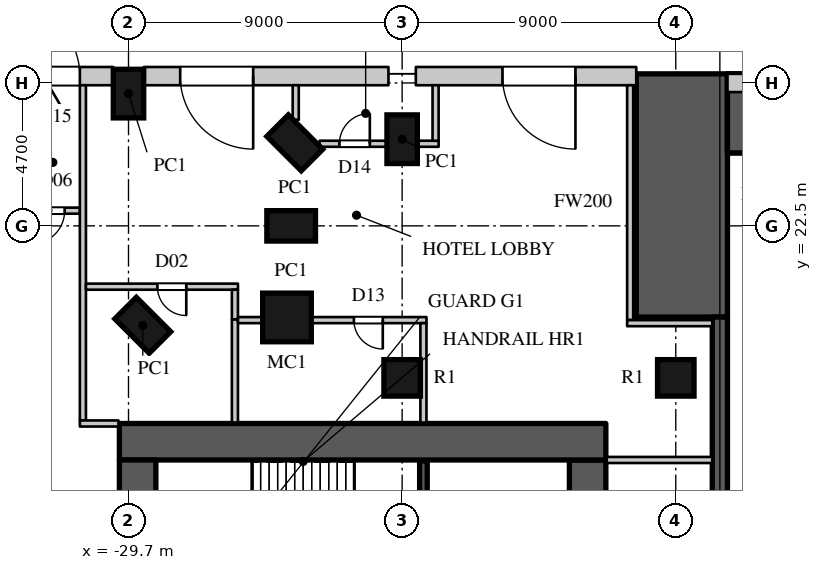
"""IFC4 building model, lengths in metres.
Left out: names, types, materials, properties, quantities, classifications, styles, units other than length and angle.
Written with IfcOpenShell. Run it as: python <this file> out.ifc"""

import sys

from ifc_helpers import new_model, si_unit, direction, frame, frame_2d, origin, origin_2d, place, context, subcontext, project, spatial, polyline, rectangle, circle, outline, extrude, element, fill, save


model = new_model("IFC4")
c1 = context("Model", 3, precision=1e-05, world=origin(), true_north=direction((0.0, 1.0)))
c2 = subcontext(c1, "Body", "Model", "MODEL_VIEW")
j1 = project(units=[si_unit("LENGTHUNIT", "METRE"), si_unit("PLANEANGLEUNIT", "RADIAN")], contexts=[c1])
p1 = place(None, origin())
s1 = spatial("IfcSite", under=j1, at=p1, CompositionType="ELEMENT")
p2 = place(p1, origin())
s2 = spatial("IfcBuilding", under=s1, at=p2, CompositionType="ELEMENT")
p3 = place(p2, origin())
s3 = spatial("IfcBuildingStorey", under=s2, at=p3, CompositionType="ELEMENT", Elevation=0.0)
p4 = place(p3, frame((-11.5, 19.5, 0.0), z_axis=(0.0, 0.0, 1.0), x_axis=(0.0, 1.0, 0.0)))
e1 = element("IfcWall", 1, at=p4, inside=s3, PredefinedType="SOLIDWALL", context=c2, shape_type="SweptSolid", body=[
    extrude(rectangle(XDim=8.0, YDim=3.0, at=frame_2d((4.0, 0.0))), origin(), (0.0, 0.0, 1.0), 9.0),
])
p5 = place(p3, frame((-10.25, -19.5, 0.0), z_axis=(0.0, 0.0, 1.0), x_axis=(0.0, 1.0, 0.0)))
e2 = element("IfcWall", 2, at=p5, inside=s3, PredefinedType="SOLIDWALL", context=c2, shape_type="SweptSolid", body=[
    extrude(rectangle(XDim=39.0, YDim=0.5, at=frame_2d((19.5, 0.0))), origin(), (0.0, 0.0, 1.0), 9.0),
])
p6 = place(p5, frame((6.0, 0.0, 0.0)))
e3 = element("IfcOpeningElement", 3, at=p6, cuts=e2, PredefinedType="OPENING", context=c2, shape_type="SweptSolid", body=[
    extrude(rectangle(XDim=2.0, YDim=2.7, at=frame_2d((1.0, 1.35))), frame((0.0, 0.26, 0.0), z_axis=(0.0, -1.0, 0.0), x_axis=(1.0, 0.0, 0.0)), (0.0, 0.0, 1.0), 0.52),
])
p7 = place(p5, frame((31.0, 0.0, 0.0)))
e4 = element("IfcOpeningElement", 4, at=p7, cuts=e2, PredefinedType="OPENING", context=c2, shape_type="SweptSolid", body=[
    extrude(rectangle(XDim=2.0, YDim=2.7, at=frame_2d((1.0, 1.35))), frame((0.0, 0.26, 0.0), z_axis=(0.0, -1.0, 0.0), x_axis=(1.0, 0.0, 0.0)), (0.0, 0.0, 1.0), 0.52),
])
p8 = place(p3, frame((-10.0, 27.2, 0.0), z_axis=(0.0, 0.0, 1.0), x_axis=(1.0, 0.0, 0.0)))
e5 = element("IfcWall", 5, at=p8, inside=s3, PredefinedType="SOLIDWALL", context=c2, shape_type="SweptSolid", body=[
    extrude(outline(polyline([(24.0, 11.553), (18.661, 23.543), (15.919, 22.326), (18.264, 24.131), (17.882, 24.696), (17.248, 25.422), (16.575, 26.079), (16.345, 26.278), (15.85, 26.664), (15.061, 27.167), (14.198, 27.573), (13.259, 27.854), (12.757, 27.94), (12.262, 27.983), (11.738, 27.983), (11.243, 27.94), (10.741, 27.854), (9.802, 27.573), (8.939, 27.167), (8.15, 26.664), (7.655, 26.278), (7.425, 26.079), (6.752, 25.422), (6.118, 24.696), (5.736, 24.131), (8.081, 22.326), (5.339, 23.543), (0.0, 11.553), (0.0, 28.6), (24.0, 28.6), (24.0, 11.553)])), frame((0.0, 0.3, 0.0), z_axis=(0.0, -1.0, 0.0), x_axis=(1.0, 0.0, 0.0)), (0.0, 0.0, 1.0), 0.6),
])
p9 = place(p3, frame((-10.0, 26.2, 0.0), z_axis=(0.0, 0.0, 1.0), x_axis=(1.0, 0.0, 0.0)))
e6 = element("IfcWall", 6, at=p9, inside=s3, PredefinedType="SOLIDWALL", context=c2, shape_type="SweptSolid", body=[
    extrude(outline(polyline([(2.5, 9.332), (2.0, 7.639), (1.5, 5.859), (1.0, 3.993), (0.5, 2.04), (0.0, 0.0), (0.0, 11.553), (2.74, 10.333), (2.977, 10.865), (2.5, 9.332)])), frame((0.0, 1.3, 0.0), z_axis=(0.0, -1.0, 0.0), x_axis=(1.0, 0.0, 0.0)), (0.0, 0.0, 1.0), 2.6),
])
for number, where, z_axis, x_axis in (
    (7, (-29.231, 19.231, 0.0), (0.0, 0.0, 1.0), (-0.707, -0.707, 0.0)),
    (8, (-20.7, 25.35, 0.0), (0.0, 0.0, 1.0), (-1.0, 0.0, 0.0)),
    (9, (-24.231, 25.231, 0.0), (0.0, 0.0, 1.0), (-0.707, -0.707, 0.0)),
    (10, (-24.35, 22.5, 0.0), (0.0, 0.0, 1.0), (0.0, -1.0, 0.0)),
):
    element("IfcColumn", number, at=place(p3, frame(where, z_axis=z_axis, x_axis=x_axis)), inside=s3, PredefinedType="COLUMN", context=c2, shape_type="SweptSolid", body=[
        extrude(rectangle(XDim=1.0, YDim=1.6, at=origin_2d()), origin(), (0.0, 0.0, 1.0), 9.0),
    ])
p10 = place(p3, frame((-24.488, 19.488, 0.0), z_axis=(0.0, 0.0, 1.0), x_axis=(1.0, 0.0, 0.0)))
e11 = element("IfcColumn", 11, at=p10, inside=s3, PredefinedType="COLUMN", context=c2, shape_type="SweptSolid", body=[
    extrude(circle(Radius=0.8, at=origin_2d()), origin(), (0.0, 0.0, 1.0), 9.0),
])
p11 = place(p3, frame((-29.7, 26.85, 0.0), z_axis=(0.0, 0.0, 1.0), x_axis=(-1.0, 0.0, 0.0)))
e12 = element("IfcColumn", 12, at=p11, inside=s3, PredefinedType="COLUMN", context=c2, shape_type="SweptSolid", body=[
    extrude(rectangle(XDim=1.0, YDim=1.6, at=origin_2d()), origin(), (0.0, 0.0, 1.0), 9.0),
])
for number, where, z_axis, x_axis in (
    (13, (-20.7, 17.5, 0.0), (0.0, 0.0, 1.0), (1.0, 0.0, 0.0)),
    (14, (-11.7, 17.5, 0.0), (0.0, 0.0, 1.0), (1.0, 0.0, 0.0)),
):
    element("IfcColumn", number, at=place(p3, frame(where, z_axis=z_axis, x_axis=x_axis)), inside=s3, PredefinedType="COLUMN", context=c2, shape_type="SweptSolid", body=[
        extrude(circle(Radius=0.6, at=origin_2d()), origin(), (0.0, 0.0, 1.0), 9.0),
    ])
p12 = place(p3, frame((-13.0, 27.425, 0.0), z_axis=(0.0, 0.0, 1.0), x_axis=(-1.0, 0.0, 0.0)))
e15 = element("IfcWall", 15, at=p12, inside=s3, PredefinedType="ELEMENTEDWALL", context=c2, shape_type="SweptSolid", body=[
    extrude(rectangle(XDim=7.25, YDim=0.6, at=frame_2d((3.625, 0.0))), origin(), (0.0, 0.0, 1.0), 8.6),
])
p13 = place(p12, frame((2.0, 0.0, 0.0)))
e16 = element("IfcOpeningElement", 16, at=p13, cuts=e15, PredefinedType="OPENING", context=c2, shape_type="SweptSolid", body=[
    extrude(rectangle(XDim=2.4, YDim=3.0, at=frame_2d((1.2, 1.5))), frame((0.0, 0.31, 0.0), z_axis=(0.0, -1.0, 0.0), x_axis=(1.0, 0.0, 0.0)), (0.0, 0.0, 1.0), 0.62),
])
p14 = place(p3, frame((-21.15, 27.425, 0.0), z_axis=(0.0, 0.0, 1.0), x_axis=(-1.0, 0.0, 0.0)))
e17 = element("IfcWall", 17, at=p14, inside=s3, PredefinedType="ELEMENTEDWALL", context=c2, shape_type="SweptSolid", body=[
    extrude(rectangle(XDim=8.05, YDim=0.6, at=frame_2d((4.025, 0.0))), origin(), (0.0, 0.0, 1.0), 8.6),
])
p15 = place(p14, frame((4.45, 0.0, 0.0)))
e18 = element("IfcOpeningElement", 18, at=p15, cuts=e17, PredefinedType="OPENING", context=c2, shape_type="SweptSolid", body=[
    extrude(rectangle(XDim=2.4, YDim=3.0, at=frame_2d((1.2, 1.5))), frame((0.0, 0.31, 0.0), z_axis=(0.0, -1.0, 0.0), x_axis=(1.0, 0.0, 0.0)), (0.0, 0.0, 1.0), 0.62),
])
p16 = place(p3, frame((-37.993, 27.425, 0.0), z_axis=(0.0, 0.0, 1.0), x_axis=(1.0, 0.0, 0.0)))
e19 = element("IfcWall", 19, at=p16, inside=s3, PredefinedType="ELEMENTEDWALL", context=c2, shape_type="SweptSolid", body=[
    extrude(rectangle(XDim=7.793, YDim=0.6, at=frame_2d((3.896, 0.0))), origin(), (0.0, 0.0, 1.0), 8.6),
])
p17 = place(p16, frame((4.293, 0.0, 0.0)))
e20 = element("IfcOpeningElement", 20, at=p17, cuts=e19, PredefinedType="OPENING", context=c2, shape_type="SweptSolid", body=[
    extrude(rectangle(XDim=2.4, YDim=3.0, at=frame_2d((1.2, 1.5))), frame((0.0, 0.31, 0.0), z_axis=(0.0, -1.0, 0.0), x_axis=(1.0, 0.0, 0.0)), (0.0, 0.0, 1.0), 0.62),
])
p18 = place(p3, frame((-30.0, 15.4, 0.0), z_axis=(0.0, 0.0, 1.0), x_axis=(1.0, 0.0, 0.0)))
e21 = element("IfcWall", 21, at=p18, inside=s3, PredefinedType="SHEAR", context=c2, shape_type="SweptSolid", body=[
    extrude(rectangle(XDim=16.0, YDim=1.2, at=frame_2d((8.0, 0.0))), origin(), (0.0, 0.0, 1.0), 9.0),
])
p19 = place(p3, frame((-14.6, -14.8, 0.0), z_axis=(0.0, 0.0, 1.0), x_axis=(0.0, 1.0, 0.0)))
e22 = element("IfcWall", 22, at=p19, inside=s3, PredefinedType="SHEAR", context=c2, shape_type="SweptSolid", body=[
    extrude(rectangle(XDim=29.6, YDim=1.2, at=frame_2d((14.8, 0.0))), origin(), (0.0, 0.0, 1.0), 9.0),
])
p20 = place(p19, frame((1.55, 0.0, 0.0)))
e23 = element("IfcOpeningElement", 23, at=p20, cuts=e22, PredefinedType="OPENING", context=c2, shape_type="SweptSolid", body=[
    extrude(rectangle(XDim=1.5, YDim=2.4, at=frame_2d((0.75, 1.2))), frame((0.0, 0.61, 0.0), z_axis=(0.0, -1.0, 0.0), x_axis=(1.0, 0.0, 0.0)), (0.0, 0.0, 1.0), 1.22),
])
p21 = place(p19, frame((26.55, 0.0, 0.0)))
e24 = element("IfcOpeningElement", 24, at=p21, cuts=e22, PredefinedType="OPENING", context=c2, shape_type="SweptSolid", body=[
    extrude(rectangle(XDim=1.5, YDim=2.4, at=frame_2d((0.75, 1.2))), frame((0.0, 0.61, 0.0), z_axis=(0.0, -1.0, 0.0), x_axis=(1.0, 0.0, 0.0)), (0.0, 0.0, 1.0), 1.22),
])
p22 = place(p19, frame((8.45, 0.0, 0.0)))
e25 = element("IfcOpeningElement", 25, at=p22, cuts=e22, PredefinedType="OPENING", context=c2, shape_type="SweptSolid", body=[
    extrude(rectangle(XDim=1.5, YDim=2.4, at=frame_2d((0.75, 1.2))), frame((0.0, 0.61, 0.0), z_axis=(0.0, -1.0, 0.0), x_axis=(1.0, 0.0, 0.0)), (0.0, 0.0, 1.0), 1.22),
])
p23 = place(p19, frame((19.65, 0.0, 0.0)))
e26 = element("IfcOpeningElement", 26, at=p23, cuts=e22, PredefinedType="OPENING", context=c2, shape_type="SweptSolid", body=[
    extrude(rectangle(XDim=1.5, YDim=2.4, at=frame_2d((0.75, 1.2))), frame((0.0, 0.61, 0.0), z_axis=(0.0, -1.0, 0.0), x_axis=(1.0, 0.0, 0.0)), (0.0, 0.0, 1.0), 1.22),
])
p24 = place(p19, frame((14.5, 0.0, 0.0)))
e27 = element("IfcOpeningElement", 27, at=p24, cuts=e22, PredefinedType="OPENING", context=c2, shape_type="SweptSolid", body=[
    extrude(rectangle(XDim=0.6, YDim=2.0, at=frame_2d((0.3, 1.0))), frame((0.0, 0.61, 0.0), z_axis=(0.0, -1.0, 0.0), x_axis=(1.0, 0.0, 0.0)), (0.0, 0.0, 1.0), 1.22),
])
p25 = place(p3, frame((-29.4, 10.2, 0.0), z_axis=(0.0, 0.0, 1.0), x_axis=(0.0, 1.0, 0.0)))
e28 = element("IfcWall", 28, at=p25, inside=s3, PredefinedType="SHEAR", context=c2, shape_type="SweptSolid", body=[
    extrude(rectangle(XDim=4.6, YDim=1.2, at=frame_2d((2.3, 0.0))), origin(), (0.0, 0.0, 1.0), 9.0),
])
p26 = place(p3, frame((-33.05, 23.0, 0.0), z_axis=(0.0, 0.0, 1.0), x_axis=(1.0, 0.0, 0.0)))
e29 = element("IfcWall", 29, at=p26, inside=s3, PredefinedType="PARTITIONING", context=c2, shape_type="SweptSolid", body=[
    extrude(rectangle(XDim=1.75, YDim=0.2, at=frame_2d((0.875, 0.0))), origin(), (0.0, 0.0, 1.0), 8.598),
])
p27 = place(p26, frame((0.15, 0.0, 0.0)))
e30 = element("IfcOpeningElement", 30, at=p27, cuts=e29, PredefinedType="OPENING", context=c2, shape_type="SweptSolid", body=[
    extrude(rectangle(XDim=1.1, YDim=2.2, at=frame_2d((0.55, 1.1))), frame((0.0, 0.11, 0.0), z_axis=(0.0, -1.0, 0.0), x_axis=(1.0, 0.0, 0.0)), (0.0, 0.0, 1.0), 0.22),
])
p28 = place(p3, frame((-31.2, 16.1, 0.0), z_axis=(0.0, 0.0, 1.0), x_axis=(0.0, 1.0, 0.0)))
e31 = element("IfcWall", 31, at=p28, inside=s3, PredefinedType="PARTITIONING", context=c2, shape_type="SweptSolid", body=[
    extrude(rectangle(XDim=11.025, YDim=0.2, at=frame_2d((5.512, 0.0))), origin(), (0.0, 0.0, 1.0), 8.598),
])
p29 = place(p3, frame((-31.3, 16.0, 0.0), z_axis=(0.0, 0.0, 1.0), x_axis=(1.0, 0.0, 0.0)))
e32 = element("IfcWall", 32, at=p29, inside=s3, PredefinedType="PARTITIONING", context=c2, shape_type="SweptSolid", body=[
    extrude(rectangle(XDim=1.27, YDim=0.2, at=frame_2d((0.635, 0.0))), origin(), (0.0, 0.0, 1.0), 8.598),
])
p30 = place(p3, frame((-31.1, 20.5, 0.0), z_axis=(0.0, 0.0, 1.0), x_axis=(1.0, 0.0, 0.0)))
e33 = element("IfcWall", 33, at=p30, inside=s3, PredefinedType="PARTITIONING", context=c2, shape_type="SweptSolid", body=[
    extrude(rectangle(XDim=5.0, YDim=0.2, at=frame_2d((2.5, 0.0))), origin(), (0.0, 0.0, 1.0), 8.598),
])
p31 = place(p30, frame((2.35, 0.0, 0.0)))
e34 = element("IfcOpeningElement", 34, at=p31, cuts=e33, PredefinedType="OPENING", context=c2, shape_type="SweptSolid", body=[
    extrude(rectangle(XDim=0.95, YDim=2.2, at=frame_2d((0.475, 1.1))), frame((0.0, 0.11, 0.0), z_axis=(0.0, -1.0, 0.0), x_axis=(1.0, 0.0, 0.0)), (0.0, 0.0, 1.0), 0.22),
])
p32 = place(p3, frame((-26.2, 19.42, 0.0), z_axis=(0.0, 0.0, 1.0), x_axis=(0.0, 1.0, 0.0)))
e35 = element("IfcWall", 35, at=p32, inside=s3, PredefinedType="PARTITIONING", context=c2, shape_type="SweptSolid", body=[
    extrude(rectangle(XDim=0.98, YDim=0.2, at=frame_2d((0.49, 0.0))), origin(), (0.0, 0.0, 1.0), 8.598),
])
p33 = place(p3, frame((-24.2, 25.987, 0.0), z_axis=(0.0, 0.0, 1.0), x_axis=(0.0, 1.0, 0.0)))
e36 = element("IfcWall", 36, at=p33, inside=s3, PredefinedType="PARTITIONING", context=c2, shape_type="SweptSolid", body=[
    extrude(rectangle(XDim=1.138, YDim=0.2, at=frame_2d((0.569, 0.0))), origin(), (0.0, 0.0, 1.0), 8.598),
])
p34 = place(p3, frame((-23.413, 25.2, 0.0), z_axis=(0.0, 0.0, 1.0), x_axis=(1.0, 0.0, 0.0)))
e37 = element("IfcWall", 37, at=p34, inside=s3, PredefinedType="PARTITIONING", context=c2, shape_type="SweptSolid", body=[
    extrude(rectangle(XDim=2.213, YDim=0.2, at=frame_2d((1.106, 0.0))), origin(), (0.0, 0.0, 1.0), 8.598),
])
p35 = place(p34, frame((0.65, 0.0, 0.0)))
e38 = element("IfcOpeningElement", 38, at=p35, cuts=e37, PredefinedType="OPENING", context=c2, shape_type="SweptSolid", body=[
    extrude(rectangle(XDim=1.0, YDim=2.2, at=frame_2d((0.5, 1.1))), frame((0.0, 0.11, 0.0), z_axis=(0.0, -1.0, 0.0), x_axis=(1.0, 0.0, 0.0)), (0.0, 0.0, 1.0), 0.22),
])
p36 = place(p3, frame((-20.2, 25.2, 0.0), z_axis=(0.0, 0.0, 1.0), x_axis=(1.0, 0.0, 0.0)))
e39 = element("IfcWall", 39, at=p36, inside=s3, PredefinedType="PARTITIONING", context=c2, shape_type="SweptSolid", body=[
    extrude(rectangle(XDim=0.7, YDim=0.2, at=frame_2d((0.35, 0.0))), origin(), (0.0, 0.0, 1.0), 8.598),
])
p37 = place(p3, frame((-19.6, 25.3, 0.0), z_axis=(0.0, 0.0, 1.0), x_axis=(0.0, 1.0, 0.0)))
e40 = element("IfcWall", 40, at=p37, inside=s3, PredefinedType="PARTITIONING", context=c2, shape_type="SweptSolid", body=[
    extrude(rectangle(XDim=1.825, YDim=0.2, at=frame_2d((0.913, 0.0))), origin(), (0.0, 0.0, 1.0), 8.598),
])
p38 = place(p3, frame((-13.97, 14.8, 0.0), z_axis=(0.0, 0.0, 1.0), x_axis=(1.0, 0.0, 0.0)))
e41 = element("IfcWall", 41, at=p38, inside=s3, PredefinedType="PARTITIONING", context=c2, shape_type="SweptSolid", body=[
    extrude(rectangle(XDim=3.47, YDim=0.2, at=frame_2d((1.735, 0.0))), origin(), (0.0, 0.0, 1.0), 8.598),
])
p39 = place(p3, frame((-13.2, 19.401, 0.0), z_axis=(0.0, 0.0, 1.0), x_axis=(0.0, 1.0, 0.0)))
e42 = element("IfcWall", 42, at=p39, inside=s3, PredefinedType="PARTITIONING", context=c2, shape_type="SweptSolid", body=[
    extrude(rectangle(XDim=7.724, YDim=0.2, at=frame_2d((3.862, 0.0))), origin(), (0.0, 0.0, 1.0), 8.598),
])
p40 = place(p3, frame((-13.299, 19.3, 0.0), z_axis=(0.0, 0.0, 1.0), x_axis=(1.0, 0.0, 0.0)))
e43 = element("IfcWall", 43, at=p40, inside=s3, PredefinedType="PARTITIONING", context=c2, shape_type="SweptSolid", body=[
    extrude(rectangle(XDim=2.799, YDim=0.2, at=frame_2d((1.399, 0.0))), origin(), (0.0, 0.0, 1.0), 8.598),
])
p41 = place(p3, frame((-26.2, 16.03, 0.0), z_axis=(0.0, 0.0, 1.0), x_axis=(0.0, 1.0, 0.0)))
e44 = element("IfcWall", 44, at=p41, inside=s3, PredefinedType="PARTITIONING", context=c2, shape_type="SweptSolid", body=[
    extrude(rectangle(XDim=3.39, YDim=0.2, at=frame_2d((1.695, 0.0))), origin(), (0.0, 0.0, 1.0), 8.598),
])
p42 = place(p3, frame((-26.1, 19.4, 0.0), z_axis=(0.0, 0.0, 1.0), x_axis=(1.0, 0.0, 0.0)))
e45 = element("IfcWall", 45, at=p42, inside=s3, PredefinedType="PARTITIONING", context=c2, shape_type="SweptSolid", body=[
    extrude(rectangle(XDim=0.811, YDim=0.2, at=frame_2d((0.405, 0.0))), origin(), (0.0, 0.0, 1.0), 8.598),
])
p43 = place(p3, frame((-23.687, 19.4, 0.0), z_axis=(0.0, 0.0, 1.0), x_axis=(1.0, 0.0, 0.0)))
e46 = element("IfcWall", 46, at=p43, inside=s3, PredefinedType="PARTITIONING", context=c2, shape_type="SweptSolid", body=[
    extrude(rectangle(XDim=3.787, YDim=0.2, at=frame_2d((1.893, 0.0))), origin(), (0.0, 0.0, 1.0), 8.598),
])
p44 = place(p43, frame((1.4, 0.0, 0.0)))
e47 = element("IfcOpeningElement", 47, at=p44, cuts=e46, PredefinedType="OPENING", context=c2, shape_type="SweptSolid", body=[
    extrude(rectangle(XDim=0.95, YDim=2.2, at=frame_2d((0.475, 1.1))), frame((0.0, 0.11, 0.0), z_axis=(0.0, -1.0, 0.0), x_axis=(1.0, 0.0, 0.0)), (0.0, 0.0, 1.0), 0.22),
])
p45 = place(p3, frame((-20.0, 16.03, 0.0), z_axis=(0.0, 0.0, 1.0), x_axis=(0.0, 1.0, 0.0)))
e48 = element("IfcWall", 48, at=p45, inside=s3, PredefinedType="PARTITIONING", context=c2, shape_type="SweptSolid", body=[
    extrude(rectangle(XDim=3.27, YDim=0.2, at=frame_2d((1.635, 0.0))), origin(), (0.0, 0.0, 1.0), 8.598),
])
p46 = place(p3, frame((-20.0, 10.325, 0.0), z_axis=(0.0, 0.0, 1.0), x_axis=(0.0, 1.0, 0.0)))
e49 = element("IfcWall", 49, at=p46, inside=s3, PredefinedType="SHEAR", context=c2, shape_type="SweptSolid", body=[
    extrude(rectangle(XDim=4.445, YDim=0.25, at=frame_2d((2.223, 0.0))), origin(), (0.0, 0.0, 1.0), 8.598),
])
p47 = place(p46, frame((1.65, 0.0, 0.0)))
e50 = element("IfcOpeningElement", 50, at=p47, cuts=e49, PredefinedType="OPENING", context=c2, shape_type="SweptSolid", body=[
    extrude(rectangle(XDim=1.1, YDim=2.2, at=frame_2d((0.55, 1.1))), frame((0.0, 0.135, 0.0), z_axis=(0.0, -1.0, 0.0), x_axis=(1.0, 0.0, 0.0)), (0.0, 0.0, 1.0), 0.27),
])
p48 = place(p13, origin())
e51 = element("IfcDoor", 51, at=p48, inside=s3, OperationType="DOUBLE_DOOR_SINGLE_SWING", PredefinedType="DOOR", context=c2, shape_type="SweptSolid", body=[
    extrude(rectangle(XDim=2.4, YDim=3.0, at=frame_2d((1.2, 1.5))), frame((0.0, -0.05, 0.0), z_axis=(0.0, -1.0, 0.0), x_axis=(1.0, 0.0, 0.0)), (0.0, 0.0, 1.0), 0.05),
])
fill(e16, e51)
p49 = place(p15, origin())
e52 = element("IfcDoor", 52, at=p49, inside=s3, OperationType="DOUBLE_DOOR_SINGLE_SWING", PredefinedType="DOOR", context=c2, shape_type="SweptSolid", body=[
    extrude(rectangle(XDim=2.4, YDim=3.0, at=frame_2d((1.2, 1.5))), frame((0.0, -0.05, 0.0), z_axis=(0.0, -1.0, 0.0), x_axis=(1.0, 0.0, 0.0)), (0.0, 0.0, 1.0), 0.05),
])
fill(e18, e52)
p50 = place(p17, origin())
e53 = element("IfcDoor", 53, at=p50, inside=s3, OperationType="DOUBLE_DOOR_SINGLE_SWING", PredefinedType="DOOR", context=c2, shape_type="SweptSolid", body=[
    extrude(rectangle(XDim=2.4, YDim=3.0, at=frame_2d((1.2, 1.5))), frame((0.0, -0.05, 0.0), z_axis=(0.0, -1.0, 0.0), x_axis=(1.0, 0.0, 0.0)), (0.0, 0.0, 1.0), 0.05),
])
fill(e20, e53)
p51 = place(p31, origin())
e54 = element("IfcDoor", 54, at=p51, inside=s3, OperationType="SINGLE_SWING_LEFT", PredefinedType="DOOR", context=c2, shape_type="SweptSolid", body=[
    extrude(rectangle(XDim=0.95, YDim=2.2, at=frame_2d((0.475, 1.1))), frame((0.0, 0.025, 0.0), z_axis=(0.0, -1.0, 0.0), x_axis=(1.0, 0.0, 0.0)), (0.0, 0.0, 1.0), 0.05),
])
fill(e34, e54)
p52 = place(p44, origin())
e55 = element("IfcDoor", 55, at=p52, inside=s3, OperationType="SINGLE_SWING_LEFT", PredefinedType="DOOR", context=c2, shape_type="SweptSolid", body=[
    extrude(rectangle(XDim=0.95, YDim=2.2, at=frame_2d((0.475, 1.1))), frame((0.0, 0.025, 0.0), z_axis=(0.0, -1.0, 0.0), x_axis=(1.0, 0.0, 0.0)), (0.0, 0.0, 1.0), 0.05),
])
fill(e47, e55)
p53 = place(p35, origin())
e56 = element("IfcDoor", 56, at=p53, inside=s3, OperationType="SINGLE_SWING_RIGHT", PredefinedType="DOOR", context=c2, shape_type="SweptSolid", body=[
    extrude(rectangle(XDim=1.0, YDim=2.2, at=frame_2d((0.5, 1.1))), frame((0.0, 0.025, 0.0), z_axis=(0.0, -1.0, 0.0), x_axis=(1.0, 0.0, 0.0)), (0.0, 0.0, 1.0), 0.05),
])
fill(e38, e56)
p54 = place(p27, origin())
e57 = element("IfcDoor", 57, at=p54, inside=s3, OperationType="SINGLE_SWING_RIGHT", PredefinedType="DOOR", context=c2, shape_type="SweptSolid", body=[
    extrude(rectangle(XDim=1.1, YDim=2.2, at=frame_2d((0.55, 1.1))), frame((0.0, 0.025, 0.0), z_axis=(0.0, -1.0, 0.0), x_axis=(1.0, 0.0, 0.0)), (0.0, 0.0, 1.0), 0.05),
])
fill(e30, e57)
save(model, sys.argv[1])
